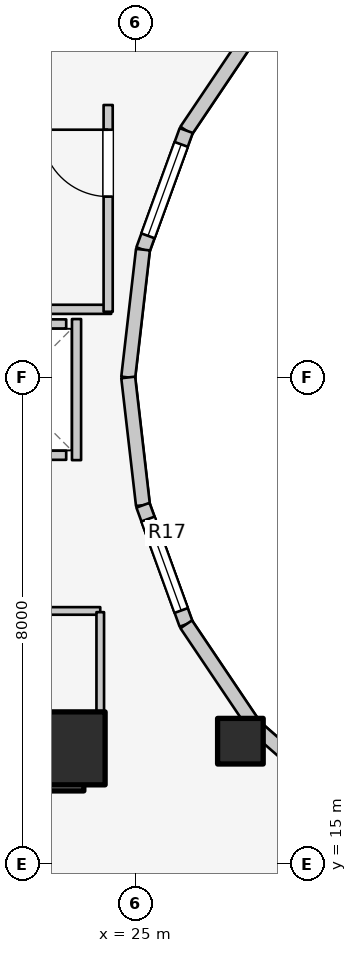
"""IFC4 building model, lengths in metres.
Left out: names, types, materials, properties, quantities, classifications, styles, units other than length and angle.
Written with IfcOpenShell. Run it as: python <this file> out.ifc"""

import sys

from ifc_helpers import new_model, si_unit, direction, frame, frame_2d, origin, origin_2d, place, context, subcontext, project, spatial, rectangle, extrude, element, fill, save


model = new_model("IFC4")
c1 = context("Model", 3, precision=1e-05, world=origin(), true_north=direction((0.0, 1.0)))
c2 = subcontext(c1, "Body", "Model", "MODEL_VIEW")
j1 = project(units=[si_unit("LENGTHUNIT", "METRE"), si_unit("PLANEANGLEUNIT", "RADIAN")], contexts=[c1])
p1 = place(None, origin())
s1 = spatial("IfcSite", under=j1, at=p1, CompositionType="ELEMENT")
p2 = place(p1, origin())
s2 = spatial("IfcBuilding", under=s1, at=p2, CompositionType="ELEMENT")
p3 = place(p2, frame((0.0, 0.0, 152.9)))
s3 = spatial("IfcBuildingStorey", under=s2, at=p3, CompositionType="ELEMENT", Elevation=152.9)
p4 = place(p3, frame((19.65, 16.55, 0.0), z_axis=(0.0, 0.0, 1.0), x_axis=(1.0, 0.0, 0.0)))
e1 = element("IfcWall", 1, at=p4, inside=s3, PredefinedType="SHEAR", context=c2, shape_type="SweptSolid", body=[
    extrude(rectangle(XDim=4.5, YDim=0.7, at=frame_2d((2.25, 0.0))), origin(), (0.0, 0.0, 1.0), 3.1),
])
p5 = place(p3, frame((23.9, 16.9, 0.0), z_axis=(0.0, 0.0, 1.0), x_axis=(1.0, 0.0, 0.0)))
e2 = element("IfcColumn", 2, at=p5, inside=s3, PredefinedType="COLUMN", context=c2, shape_type="SweptSolid", body=[
    extrude(rectangle(XDim=1.2, YDim=1.2, at=origin_2d()), origin(), (0.0, 0.0, 1.0), 3.1),
])
p6 = place(p3, frame((26.725, 17.018, 0.0), z_axis=(0.0, 0.0, 1.0), x_axis=(1.0, 0.0, 0.0)))
e3 = element("IfcColumn", 3, at=p6, inside=s3, PredefinedType="COLUMN", context=c2, shape_type="SweptSolid", body=[
    extrude(rectangle(XDim=0.75, YDim=0.75, at=origin_2d()), origin(), (0.0, 0.0, 1.0), 3.1),
])
p7 = place(p3, frame((26.965, 28.742, 0.0), z_axis=(0.0, 0.0, 1.0), x_axis=(-0.558197800898, -0.829707909492, 0.0)))
e4 = element("IfcWall", 4, at=p7, inside=s3, PredefinedType="STANDARD", context=c2, shape_type="SweptSolid", body=[
    extrude(rectangle(XDim=2.027, YDim=0.23, at=frame_2d((1.013, 0.0))), origin(), (0.0, 0.0, 1.0), 2.16),
])
p8 = place(p3, frame((25.834, 27.06, 0.0), z_axis=(0.0, 0.0, 1.0), x_axis=(-0.341423187295, -0.93990968033, 0.0)))
e5 = element("IfcWall", 5, at=p8, inside=s3, PredefinedType="STANDARD", context=c2, shape_type="SweptSolid", body=[
    extrude(rectangle(XDim=2.084, YDim=0.23, at=frame_2d((1.042, 0.0))), origin(), (0.0, 0.0, 1.0), 2.84),
])
p9 = place(p8, frame((0.242, 0.0, 0.85)))
e6 = element("IfcOpeningElement", 6, at=p9, cuts=e5, PredefinedType="OPENING", context=c2, shape_type="SweptSolid", body=[
    extrude(rectangle(XDim=1.6, YDim=1.65, at=frame_2d((0.8, 0.825))), frame((0.0, 0.125, 0.0), z_axis=(0.0, -1.0, 0.0), x_axis=(1.0, 0.0, 0.0)), (0.0, 0.0, 1.0), 0.25),
])
for number, where, z_axis, x_axis in (
    (7, (25.123, 25.102, 0.0), (0.0, 0.0, 1.0), (-0.115, -0.993, 0.0)),
    (8, (24.88, 23.0, 0.0), (0.0, 0.0, 1.0), (0.115, -0.993, 0.0)),
):
    element("IfcWall", number, at=place(p3, frame(where, z_axis=z_axis, x_axis=x_axis)), inside=s3, PredefinedType="STANDARD", context=c2, shape_type="SweptSolid", body=[
        extrude(rectangle(XDim=2.115, YDim=0.23, at=frame_2d((1.058, 0.0))), origin(), (0.0, 0.0, 1.0), 2.84),
    ])
p10 = place(p3, frame((25.123, 20.898, 0.0), z_axis=(0.0, 0.0, 1.0), x_axis=(0.341423187295, -0.93990968033, 0.0)))
e9 = element("IfcWall", 9, at=p10, inside=s3, PredefinedType="STANDARD", context=c2, shape_type="SweptSolid", body=[
    extrude(rectangle(XDim=2.084, YDim=0.23, at=frame_2d((1.042, 0.0))), origin(), (0.0, 0.0, 1.0), 2.84),
])
p11 = place(p10, frame((0.242, 0.0, 0.85)))
e10 = element("IfcOpeningElement", 10, at=p11, cuts=e9, PredefinedType="OPENING", context=c2, shape_type="SweptSolid", body=[
    extrude(rectangle(XDim=1.6, YDim=1.65, at=frame_2d((0.8, 0.825))), frame((0.0, 0.125, 0.0), z_axis=(0.0, -1.0, 0.0), x_axis=(1.0, 0.0, 0.0)), (0.0, 0.0, 1.0), 0.25),
])
p12 = place(p3, frame((25.834, 18.94, 0.0), z_axis=(0.0, 0.0, 1.0), x_axis=(0.558197800898, -0.829707909492, 0.0)))
e11 = element("IfcWall", 11, at=p12, inside=s3, PredefinedType="STANDARD", context=c2, shape_type="SweptSolid", body=[
    extrude(rectangle(XDim=2.027, YDim=0.23, at=frame_2d((1.013, 0.0))), origin(), (0.0, 0.0, 1.0), 2.16),
])
p13 = place(p3, frame((26.965, 17.258, 0.0), z_axis=(0.0, 0.0, 1.0), x_axis=(0.752576694707, -0.658504607869, 0.0)))
e12 = element("IfcWall", 12, at=p13, inside=s3, PredefinedType="STANDARD", context=c2, shape_type="SweptSolid", body=[
    extrude(rectangle(XDim=1.959, YDim=0.23, at=frame_2d((0.98, 0.0))), origin(), (0.0, 0.0, 1.0), 2.16),
])
for number, where, z_axis, x_axis in (
    (13, (22.04, 21.72, 0.0), (0.0, 0.0, 1.0), (1.0, 0.0, 0.0)),
    (14, (22.04, 23.88, 0.0), (0.0, 0.0, 1.0), (1.0, 0.0, 0.0)),
):
    element("IfcWall", number, at=place(p3, frame(where, z_axis=z_axis, x_axis=x_axis)), inside=s3, PredefinedType="SOLIDWALL", context=c2, shape_type="SweptSolid", body=[
        extrude(rectangle(XDim=1.82, YDim=0.15, at=frame_2d((0.91, 0.0))), origin(), (0.0, 0.0, 1.0), 2.12),
    ])
p14 = place(p3, frame((24.03, 21.64, 0.0), z_axis=(0.0, 0.0, 1.0), x_axis=(0.0, 1.0, 0.0)))
e15 = element("IfcWall", 15, at=p14, inside=s3, PredefinedType="SOLIDWALL", context=c2, shape_type="SweptSolid", body=[
    extrude(rectangle(XDim=2.32, YDim=0.15, at=frame_2d((1.16, 0.0))), origin(), (0.0, 0.0, 1.0), 2.12),
])
p15 = place(p3, frame((19.52, 24.12, 0.0), z_axis=(0.0, 0.0, 1.0), x_axis=(1.0, 0.0, 0.0)))
e16 = element("IfcWall", 16, at=p15, inside=s3, PredefinedType="PARTITIONING", context=c2, shape_type="SweptSolid", body=[
    extrude(rectangle(XDim=5.08, YDim=0.15, at=frame_2d((2.54, 0.0))), origin(), (0.0, 0.0, 1.0), 2.12),
])
p16 = place(p3, frame((24.55, 24.08, 0.0), z_axis=(0.0, 0.0, 1.0), x_axis=(0.0, 1.0, 0.0)))
e17 = element("IfcWall", 17, at=p16, inside=s3, PredefinedType="PARTITIONING", context=c2, shape_type="SweptSolid", body=[
    extrude(rectangle(XDim=3.4, YDim=0.15, at=frame_2d((1.7, 0.0))), origin(), (0.0, 0.0, 1.0), 2.855),
])
p17 = place(p16, frame((1.894, 0.0, 0.0)))
e18 = element("IfcOpeningElement", 18, at=p17, cuts=e17, PredefinedType="OPENING", context=c2, shape_type="SweptSolid", body=[
    extrude(rectangle(XDim=1.1, YDim=2.1, at=frame_2d((0.55, 1.05))), frame((0.0, 0.085, 0.0), z_axis=(0.0, -1.0, 0.0), x_axis=(1.0, 0.0, 0.0)), (0.0, 0.0, 1.0), 0.17),
])
p18 = place(p3, frame((19.55, 19.16, 0.0), z_axis=(0.0, 0.0, 1.0), x_axis=(1.0, 0.0, 0.0)))
e19 = element("IfcWall", 19, at=p18, inside=s3, PredefinedType="PARTITIONING", context=c2, shape_type="SweptSolid", body=[
    extrude(rectangle(XDim=4.87, YDim=0.125, at=frame_2d((2.435, 0.0))), origin(), (0.0, 0.0, 1.0), 2.12),
])
p19 = place(p18, frame((0.55, 0.0, 0.0)))
e20 = element("IfcOpeningElement", 20, at=p19, cuts=e19, PredefinedType="OPENING", context=c2, shape_type="SweptSolid", body=[
    extrude(rectangle(XDim=0.85, YDim=2.05, at=frame_2d((0.425, 1.025))), frame((0.0, 0.073, 0.0), z_axis=(0.0, -1.0, 0.0), x_axis=(1.0, 0.0, 0.0)), (0.0, 0.0, 1.0), 0.145),
])
p20 = place(p3, frame((24.42, 17.1, 0.0), z_axis=(0.0, 0.0, 1.0), x_axis=(0.0, 1.0, 0.0)))
e21 = element("IfcWall", 21, at=p20, inside=s3, PredefinedType="PARTITIONING", context=c2, shape_type="SweptSolid", body=[
    extrude(rectangle(XDim=2.04, YDim=0.125, at=frame_2d((1.02, 0.0))), origin(), (0.0, 0.0, 1.0), 2.232),
])
p21 = place(p3, frame((28.45, 15.985, 0.0), z_axis=(0.0, 0.0, 1.0), x_axis=(-0.523587550846, -0.851971875474, 0.0)))
e22 = element("IfcWall", 22, at=p21, inside=s3, PredefinedType="PARTITIONING", context=c2, shape_type="SweptSolid", body=[
    extrude(rectangle(XDim=3.153, YDim=0.125, at=frame_2d((1.577, 0.0))), origin(), (0.0, 0.0, 1.0), 2.299),
])
p22 = place(p9, origin())
e23 = element("IfcWindow", 23, at=p22, inside=s3, PartitioningType="SINGLE_PANEL", PredefinedType="WINDOW", context=c2, shape_type="SweptSolid", body=[
    extrude(rectangle(XDim=1.6, YDim=1.65, at=frame_2d((0.8, 0.825))), frame((0.0, 0.03, 0.0), z_axis=(0.0, -1.0, 0.0), x_axis=(1.0, 0.0, 0.0)), (0.0, 0.0, 1.0), 0.06),
])
fill(e6, e23)
p23 = place(p11, origin())
e24 = element("IfcWindow", 24, at=p23, inside=s3, PartitioningType="SINGLE_PANEL", PredefinedType="WINDOW", context=c2, shape_type="SweptSolid", body=[
    extrude(rectangle(XDim=1.6, YDim=1.65, at=frame_2d((0.8, 0.825))), frame((0.0, 0.03, 0.0), z_axis=(0.0, -1.0, 0.0), x_axis=(1.0, 0.0, 0.0)), (0.0, 0.0, 1.0), 0.06),
])
fill(e10, e24)
p24 = place(p17, origin())
e25 = element("IfcDoor", 25, at=p24, inside=s3, OperationType="SINGLE_SWING_RIGHT", PredefinedType="DOOR", context=c2, shape_type="SweptSolid", body=[
    extrude(rectangle(XDim=1.1, YDim=2.1, at=frame_2d((0.55, 1.05))), frame((0.0, 0.025, 0.0), z_axis=(0.0, -1.0, 0.0), x_axis=(1.0, 0.0, 0.0)), (0.0, 0.0, 1.0), 0.05),
])
fill(e18, e25)
save(model, sys.argv[1])
